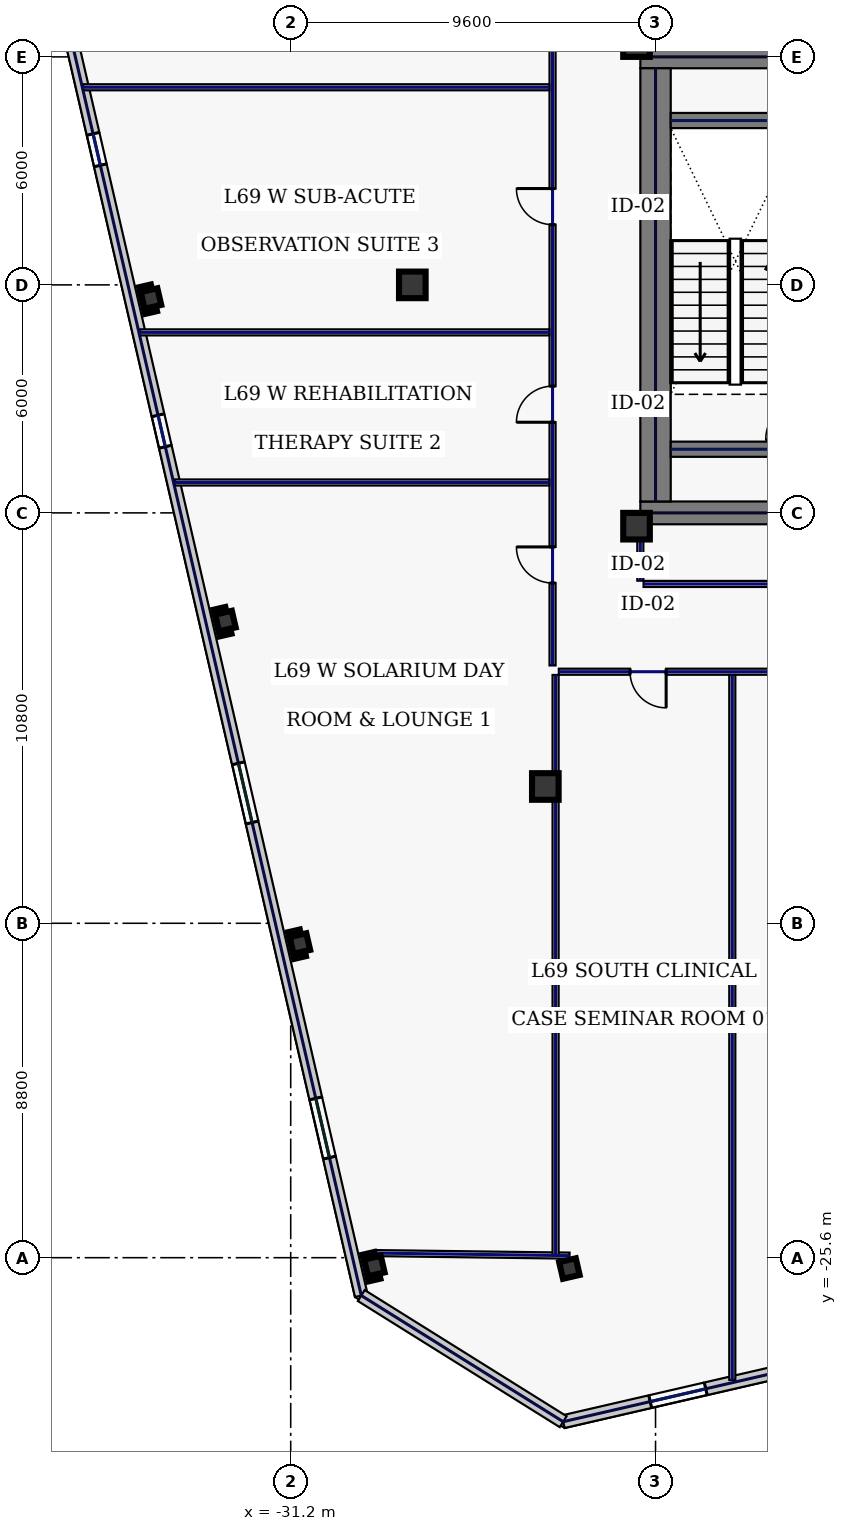
"""IFC4 building model, lengths in metres.
Left out: names, types, materials, properties, quantities, classifications, styles, units other than length and angle.
Written with IfcOpenShell. Run it as: python <this file> out.ifc"""

import sys

from ifc_helpers import new_model, si_unit, direction, frame, frame_2d, origin, origin_2d, place, context, subcontext, project, spatial, rectangle, hollow_rectangle, extrude, element, fill, save


model = new_model("IFC4")
c1 = context("Model", 3, precision=1e-05, world=origin(), true_north=direction((0.0, 1.0)))
c2 = subcontext(c1, "Body", "Model", "MODEL_VIEW")
j1 = project(units=[si_unit("LENGTHUNIT", "METRE"), si_unit("PLANEANGLEUNIT", "RADIAN")], contexts=[c1])
p1 = place(None, origin())
s1 = spatial("IfcSite", under=j1, at=p1, CompositionType="ELEMENT")
p2 = place(p1, origin())
s2 = spatial("IfcBuilding", under=s1, at=p2, CompositionType="ELEMENT")
p3 = place(p2, frame((0.0, 0.0, 297.0)))
s3 = spatial("IfcBuildingStorey", under=s2, at=p3, CompositionType="ELEMENT", Elevation=297.0)
for number, where, z_axis, x_axis in (
    (1, (-22.0, 6.0, 0.0), (0.0, 0.0, 1.0), (1.0, 0.0, 0.0)),
    (2, (-22.0, -6.0, 0.0), (0.0, 0.0, 1.0), (1.0, 0.0, 0.0)),
):
    element("IfcWall", number, at=place(p3, frame(where, z_axis=z_axis, x_axis=x_axis)), inside=s3, PredefinedType="SHEAR", context=c2, shape_type="SweptSolid", body=[
        extrude(rectangle(XDim=11.5, YDim=0.6, at=frame_2d((5.75, 0.0))), origin(), (0.0, 0.0, 1.0), 3.74),
    ])
p4 = place(p3, frame((-21.6, -5.7, 0.0), z_axis=(0.0, 0.0, 1.0), x_axis=(0.0, 1.0, 0.0)))
e3 = element("IfcWall", 3, at=p4, inside=s3, PredefinedType="SHEAR", context=c2, shape_type="SweptSolid", body=[
    extrude(rectangle(XDim=11.4, YDim=0.8, at=frame_2d((5.7, 0.0))), origin(), (0.0, 0.0, 1.0), 3.74),
])
for number, where, z_axis, x_axis in (
    (4, (-21.2, -4.325, 0.0), (0.0, 0.0, 1.0), (1.0, 0.0, 0.0)),
    (5, (-21.2, 4.325, 0.0), (0.0, 0.0, 1.0), (1.0, 0.0, 0.0)),
):
    element("IfcWall", number, at=place(p3, frame(where, z_axis=z_axis, x_axis=x_axis)), inside=s3, PredefinedType="SHEAR", context=c2, shape_type="SweptSolid", body=[
        extrude(rectangle(XDim=3.4, YDim=0.4, at=frame_2d((1.7, 0.0))), origin(), (0.0, 0.0, 1.0), 3.74),
    ])
for number, where, z_axis, x_axis in (
    (6, (-22.1, -6.35, 0.0), (0.0, 0.0, 1.0), (1.0, 0.0, 0.0)),
    (7, (-22.1, 6.35, 0.0), (0.0, 0.0, 1.0), (1.0, 0.0, 0.0)),
    (8, (-24.5, -13.2, 0.0), (0.0, 0.0, 1.0), (1.0, 0.0, 0.0)),
    (9, (-28.0, 0.0, 0.0), (0.0, 0.0, 1.0), (1.0, 0.0, 0.0)),
):
    element("IfcColumn", number, at=place(p3, frame(where, z_axis=z_axis, x_axis=x_axis)), inside=s3, PredefinedType="COLUMN", context=c2, shape_type="SweptSolid", body=[
        extrude(hollow_rectangle(XDim=0.7, YDim=0.7, WallThickness=0.032, at=origin_2d()), origin(), (0.0, 0.0, 1.0), 3.74),
    ])
for number, where, z_axis, x_axis in (
    (10, (-23.867, -25.886, 0.0), (0.0, 0.0, 1.0), (0.974, 0.225, 0.0)),
    (11, (-34.877, -0.359, 0.0), (0.0, 0.0, 1.0), (0.974, 0.225, 0.0)),
    (12, (-32.917, -8.845, 0.0), (0.0, 0.0, 1.0), (0.974, 0.225, 0.0)),
    (13, (-30.958, -17.332, 0.0), (0.0, 0.0, 1.0), (0.974, 0.225, 0.0)),
    (14, (-28.999, -25.819, 0.0), (0.0, 0.0, 1.0), (0.974, 0.225, 0.0)),
):
    element("IfcColumn", number, at=place(p3, frame(where, z_axis=z_axis, x_axis=x_axis)), inside=s3, PredefinedType="COLUMN", context=c2, shape_type="SweptSolid", body=[
        extrude(hollow_rectangle(XDim=0.45, YDim=0.45, WallThickness=0.022, at=origin_2d()), origin(), (0.0, 0.0, 1.0), 3.74),
    ])
p5 = place(p3, frame((-24.03, -29.916, 0.0), z_axis=(0.0, 0.0, 1.0), x_axis=(0.974370978061, 0.224947098473, 0.0)))
e15 = element("IfcWall", 15, at=p5, inside=s3, PredefinedType="STANDARD", context=c2, shape_type="SweptSolid", body=[
    extrude(rectangle(XDim=17.506, YDim=0.34, at=frame_2d((8.753, 0.0))), origin(), (0.0, 0.0, 1.0), 3.74),
])
p6 = place(p5, frame((2.35, 0.0, 0.9)))
e16 = element("IfcOpeningElement", 16, at=p6, cuts=e15, PredefinedType="OPENING", context=c2, shape_type="SweptSolid", body=[
    extrude(rectangle(XDim=1.5, YDim=2.0, at=frame_2d((0.75, 1.0))), frame((0.0, 0.18, 0.0), z_axis=(0.0, -1.0, 0.0), x_axis=(1.0, 0.0, 0.0)), (0.0, 0.0, 1.0), 0.36),
])
p7 = place(p5, frame((5.817, 0.0, 0.9)))
e17 = element("IfcOpeningElement", 17, at=p7, cuts=e15, PredefinedType="OPENING", context=c2, shape_type="SweptSolid", body=[
    extrude(rectangle(XDim=1.5, YDim=2.0, at=frame_2d((0.75, 1.0))), frame((0.0, 0.18, 0.0), z_axis=(0.0, -1.0, 0.0), x_axis=(1.0, 0.0, 0.0)), (0.0, 0.0, 1.0), 0.36),
])
p8 = place(p5, frame((13.353, 0.0, 0.9)))
e18 = element("IfcOpeningElement", 18, at=p8, cuts=e15, PredefinedType="OPENING", context=c2, shape_type="SweptSolid", body=[
    extrude(rectangle(XDim=1.5, YDim=2.0, at=frame_2d((0.75, 1.0))), frame((0.0, 0.18, 0.0), z_axis=(0.0, -1.0, 0.0), x_axis=(1.0, 0.0, 0.0)), (0.0, 0.0, 1.0), 0.36),
])
p9 = place(p3, frame((-37.486, 8.676, 0.0), z_axis=(0.0, 0.0, 1.0), x_axis=(0.224953091034, -0.974369594576, 0.0)))
e19 = element("IfcWall", 19, at=p9, inside=s3, PredefinedType="STANDARD", context=c2, shape_type="SweptSolid", body=[
    extrude(rectangle(XDim=36.2, YDim=0.34, at=frame_2d((18.1, 0.0))), origin(), (0.0, 0.0, 1.0), 3.74),
])
p10 = place(p9, frame((4.825, 0.0, 0.75)))
e20 = element("IfcOpeningElement", 20, at=p10, cuts=e19, PredefinedType="OPENING", context=c2, shape_type="SweptSolid", body=[
    extrude(rectangle(XDim=0.85, YDim=1.85, at=frame_2d((0.425, 0.925))), frame((0.0, 0.18, 0.0), z_axis=(0.0, -1.0, 0.0), x_axis=(1.0, 0.0, 0.0)), (0.0, 0.0, 1.0), 0.36),
])
p11 = place(p9, frame((12.425, 0.0, 0.75)))
e21 = element("IfcOpeningElement", 21, at=p11, cuts=e19, PredefinedType="OPENING", context=c2, shape_type="SweptSolid", body=[
    extrude(rectangle(XDim=0.85, YDim=1.85, at=frame_2d((0.425, 0.925))), frame((0.0, 0.18, 0.0), z_axis=(0.0, -1.0, 0.0), x_axis=(1.0, 0.0, 0.0)), (0.0, 0.0, 1.0), 0.36),
])
p12 = place(p9, frame((21.825, 0.0, 0.58)))
e22 = element("IfcOpeningElement", 22, at=p12, cuts=e19, PredefinedType="OPENING", context=c2, shape_type="SweptSolid", body=[
    extrude(rectangle(XDim=1.6, YDim=2.3, at=frame_2d((0.8, 1.15))), frame((0.0, 0.18, 0.0), z_axis=(0.0, -1.0, 0.0), x_axis=(1.0, 0.0, 0.0)), (0.0, 0.0, 1.0), 0.36),
])
p13 = place(p9, frame((30.875, 0.0, 0.58)))
e23 = element("IfcOpeningElement", 23, at=p13, cuts=e19, PredefinedType="OPENING", context=c2, shape_type="SweptSolid", body=[
    extrude(rectangle(XDim=1.6, YDim=2.3, at=frame_2d((0.8, 1.15))), frame((0.0, 0.18, 0.0), z_axis=(0.0, -1.0, 0.0), x_axis=(1.0, 0.0, 0.0)), (0.0, 0.0, 1.0), 0.36),
])
p14 = place(p3, frame((-29.343, -26.596, 0.0), z_axis=(0.0, 0.0, 1.0), x_axis=(0.848037708252, -0.529935887993, 0.0)))
e24 = element("IfcWall", 24, at=p14, inside=s3, PredefinedType="STANDARD", context=c2, shape_type="SweptSolid", body=[
    extrude(rectangle(XDim=6.265, YDim=0.34, at=frame_2d((3.133, 0.0))), origin(), (0.0, 0.0, 1.0), 3.74),
])
p15 = place(p3, frame((-28.994, -25.479, 0.0), z_axis=(0.0, 0.0, 1.0), x_axis=(0.999915052546, -0.01303409726, 0.0)))
e25 = element("IfcWall", 25, at=p15, inside=s3, PredefinedType="PARTITIONING", context=c2, shape_type="SweptSolid", body=[
    extrude(rectangle(XDim=5.132, YDim=0.16, at=frame_2d((2.566, 0.0))), origin(), (0.0, 0.0, 1.0), 3.74),
])
p16 = place(p3, frame((-24.31, -10.015, 0.0), z_axis=(0.0, 0.0, 1.0), x_axis=(0.0, 1.0, 0.0)))
e26 = element("IfcWall", 26, at=p16, inside=s3, PredefinedType="PARTITIONING", context=c2, shape_type="SweptSolid", body=[
    extrude(rectangle(XDim=20.13, YDim=0.16, at=frame_2d((10.065, 0.0))), origin(), (0.0, 0.0, 1.0), 3.74),
])
p17 = place(p16, frame((2.169, 0.0, 0.0)))
e27 = element("IfcOpeningElement", 27, at=p17, cuts=e26, PredefinedType="OPENING", context=c2, shape_type="SweptSolid", body=[
    extrude(rectangle(XDim=0.95, YDim=2.2, at=frame_2d((0.475, 1.1))), frame((0.0, 0.09, 0.0), z_axis=(0.0, -1.0, 0.0), x_axis=(1.0, 0.0, 0.0)), (0.0, 0.0, 1.0), 0.18),
])
p18 = place(p16, frame((6.4, 0.0, 0.0)))
e28 = element("IfcOpeningElement", 28, at=p18, cuts=e26, PredefinedType="OPENING", context=c2, shape_type="SweptSolid", body=[
    extrude(rectangle(XDim=0.95, YDim=2.2, at=frame_2d((0.475, 1.1))), frame((0.0, 0.09, 0.0), z_axis=(0.0, -1.0, 0.0), x_axis=(1.0, 0.0, 0.0)), (0.0, 0.0, 1.0), 0.18),
])
p19 = place(p16, frame((11.6, 0.0, 0.0)))
e29 = element("IfcOpeningElement", 29, at=p19, cuts=e26, PredefinedType="OPENING", context=c2, shape_type="SweptSolid", body=[
    extrude(rectangle(XDim=0.95, YDim=2.2, at=frame_2d((0.475, 1.1))), frame((0.0, 0.09, 0.0), z_axis=(0.0, -1.0, 0.0), x_axis=(1.0, 0.0, 0.0)), (0.0, 0.0, 1.0), 0.18),
])
p20 = place(p16, frame((17.131, 0.0, 0.0)))
e30 = element("IfcOpeningElement", 30, at=p20, cuts=e26, PredefinedType="OPENING", context=c2, shape_type="SweptSolid", body=[
    extrude(rectangle(XDim=0.95, YDim=2.2, at=frame_2d((0.475, 1.1))), frame((0.0, 0.09, 0.0), z_axis=(0.0, -1.0, 0.0), x_axis=(1.0, 0.0, 0.0)), (0.0, 0.0, 1.0), 0.18),
])
p21 = place(p3, frame((12.535, -10.18, 0.0), z_axis=(0.0, 0.0, 1.0), x_axis=(-1.0, 0.0, 0.0)))
e31 = element("IfcWall", 31, at=p21, inside=s3, PredefinedType="PARTITIONING", context=c2, shape_type="SweptSolid", body=[
    extrude(rectangle(XDim=36.68, YDim=0.16, at=frame_2d((18.34, 0.0))), origin(), (0.0, 0.0, 1.0), 3.74),
])
p22 = place(p21, frame((33.856, 0.0, 0.0)))
e32 = element("IfcOpeningElement", 32, at=p22, cuts=e31, PredefinedType="OPENING", context=c2, shape_type="SweptSolid", body=[
    extrude(rectangle(XDim=0.95, YDim=2.2, at=frame_2d((0.475, 1.1))), frame((0.0, 0.09, 0.0), z_axis=(0.0, -1.0, 0.0), x_axis=(1.0, 0.0, 0.0)), (0.0, 0.0, 1.0), 0.18),
])
p23 = place(p21, frame((29.015, 0.0, 0.0)))
e33 = element("IfcOpeningElement", 33, at=p23, cuts=e31, PredefinedType="OPENING", context=c2, shape_type="SweptSolid", body=[
    extrude(rectangle(XDim=0.95, YDim=2.2, at=frame_2d((0.475, 1.1))), frame((0.0, 0.09, 0.0), z_axis=(0.0, -1.0, 0.0), x_axis=(1.0, 0.0, 0.0)), (0.0, 0.0, 1.0), 0.18),
])
p24 = place(p21, frame((22.935, 0.0, 0.0)))
e34 = element("IfcOpeningElement", 34, at=p24, cuts=e31, PredefinedType="OPENING", context=c2, shape_type="SweptSolid", body=[
    extrude(rectangle(XDim=1.3, YDim=2.2, at=frame_2d((0.65, 1.1))), frame((0.0, 0.09, 0.0), z_axis=(0.0, -1.0, 0.0), x_axis=(1.0, 0.0, 0.0)), (0.0, 0.0, 1.0), 0.18),
])
p25 = place(p21, frame((17.555, 0.0, 0.0)))
e35 = element("IfcOpeningElement", 35, at=p25, cuts=e31, PredefinedType="OPENING", context=c2, shape_type="SweptSolid", body=[
    extrude(rectangle(XDim=1.3, YDim=2.2, at=frame_2d((0.65, 1.1))), frame((0.0, 0.09, 0.0), z_axis=(0.0, -1.0, 0.0), x_axis=(1.0, 0.0, 0.0)), (0.0, 0.0, 1.0), 0.18),
])
p26 = place(p21, frame((9.97, 0.0, 0.0)))
e36 = element("IfcOpeningElement", 36, at=p26, cuts=e31, PredefinedType="OPENING", context=c2, shape_type="SweptSolid", body=[
    extrude(rectangle(XDim=1.3, YDim=2.2, at=frame_2d((0.65, 1.1))), frame((0.0, 0.09, 0.0), z_axis=(0.0, -1.0, 0.0), x_axis=(1.0, 0.0, 0.0)), (0.0, 0.0, 1.0), 0.18),
])
p27 = place(p21, frame((2.329, 0.0, 0.0)))
e37 = element("IfcOpeningElement", 37, at=p27, cuts=e31, PredefinedType="OPENING", context=c2, shape_type="SweptSolid", body=[
    extrude(rectangle(XDim=0.95, YDim=2.2, at=frame_2d((0.475, 1.1))), frame((0.0, 0.09, 0.0), z_axis=(0.0, -1.0, 0.0), x_axis=(1.0, 0.0, 0.0)), (0.0, 0.0, 1.0), 0.18),
])
p28 = place(p3, frame((-22.0, -6.42, 0.0), z_axis=(0.0, 0.0, 1.0), x_axis=(0.0, -1.0, 0.0)))
e38 = element("IfcWall", 38, at=p28, inside=s3, PredefinedType="PARTITIONING", context=c2, shape_type="SweptSolid", body=[
    extrude(rectangle(XDim=1.365, YDim=0.16, at=frame_2d((0.683, 0.0))), origin(), (0.0, 0.0, 1.0), 3.74),
])
p29 = place(p3, frame((-21.915, -7.87, 0.0), z_axis=(0.0, 0.0, 1.0), x_axis=(1.0, 0.0, 0.0)))
e39 = element("IfcWall", 39, at=p29, inside=s3, PredefinedType="PARTITIONING", context=c2, shape_type="SweptSolid", body=[
    extrude(rectangle(XDim=11.2, YDim=0.16, at=frame_2d((5.6, 0.0))), origin(), (0.0, 0.0, 1.0), 3.74),
])
p30 = place(p3, frame((-24.23, -25.536, 0.0), z_axis=(0.0, 0.0, 1.0), x_axis=(0.0, 1.0, 0.0)))
e40 = element("IfcWall", 40, at=p30, inside=s3, PredefinedType="PARTITIONING", context=c2, shape_type="SweptSolid", body=[
    extrude(rectangle(XDim=15.271, YDim=0.16, at=frame_2d((7.635, 0.0))), origin(), (0.0, 0.0, 1.0), 3.335),
])
p31 = place(p3, frame((-19.58, -28.817, 0.0), z_axis=(0.0, 0.0, 1.0), x_axis=(0.0, 1.0, 0.0)))
e41 = element("IfcWall", 41, at=p31, inside=s3, PredefinedType="PARTITIONING", context=c2, shape_type="SweptSolid", body=[
    extrude(rectangle(XDim=18.552, YDim=0.16, at=frame_2d((9.276, 0.0))), origin(), (0.0, 0.0, 1.0), 3.74),
])
p32 = place(p3, frame((-34.262, -5.2, 0.0), z_axis=(0.0, 0.0, 1.0), x_axis=(1.0, 0.0, 0.0)))
e42 = element("IfcWall", 42, at=p32, inside=s3, PredefinedType="PARTITIONING", context=c2, shape_type="SweptSolid", body=[
    extrude(rectangle(XDim=9.867, YDim=0.16, at=frame_2d((4.933, 0.0))), origin(), (0.0, 0.0, 1.0), 3.74),
])
p33 = place(p3, frame((-35.174, -1.25, 0.0), z_axis=(0.0, 0.0, 1.0), x_axis=(1.0, 0.0, 0.0)))
e43 = element("IfcWall", 43, at=p33, inside=s3, PredefinedType="PARTITIONING", context=c2, shape_type="SweptSolid", body=[
    extrude(rectangle(XDim=10.779, YDim=0.16, at=frame_2d((5.389, 0.0))), origin(), (0.0, 0.0, 1.0), 3.74),
])
p34 = place(p3, frame((-36.663, 5.2, 0.0), z_axis=(0.0, 0.0, 1.0), x_axis=(1.0, 0.0, 0.0)))
e44 = element("IfcWall", 44, at=p34, inside=s3, PredefinedType="PARTITIONING", context=c2, shape_type="SweptSolid", body=[
    extrude(rectangle(XDim=12.268, YDim=0.16, at=frame_2d((6.134, 0.0))), origin(), (0.0, 0.0, 1.0), 3.74),
])
p35 = place(p6, origin())
e45 = element("IfcWindow", 45, at=p35, inside=s3, PartitioningType="SINGLE_PANEL", PredefinedType="WINDOW", context=c2, shape_type="SweptSolid", body=[
    extrude(rectangle(XDim=1.5, YDim=2.0, at=frame_2d((0.75, 1.0))), frame((0.0, 0.03, 0.0), z_axis=(0.0, -1.0, 0.0), x_axis=(1.0, 0.0, 0.0)), (0.0, 0.0, 1.0), 0.06),
])
fill(e16, e45)
p36 = place(p10, origin())
e46 = element("IfcWindow", 46, at=p36, inside=s3, PartitioningType="SINGLE_PANEL", PredefinedType="WINDOW", context=c2, shape_type="SweptSolid", body=[
    extrude(rectangle(XDim=0.85, YDim=1.85, at=frame_2d((0.425, 0.925))), frame((0.0, 0.03, 0.0), z_axis=(0.0, -1.0, 0.0), x_axis=(1.0, 0.0, 0.0)), (0.0, 0.0, 1.0), 0.06),
])
fill(e20, e46)
p37 = place(p11, origin())
e47 = element("IfcWindow", 47, at=p37, inside=s3, PartitioningType="SINGLE_PANEL", PredefinedType="WINDOW", context=c2, shape_type="SweptSolid", body=[
    extrude(rectangle(XDim=0.85, YDim=1.85, at=frame_2d((0.425, 0.925))), frame((0.0, 0.03, 0.0), z_axis=(0.0, -1.0, 0.0), x_axis=(1.0, 0.0, 0.0)), (0.0, 0.0, 1.0), 0.06),
])
fill(e21, e47)
p38 = place(p12, origin())
e48 = element("IfcWindow", 48, at=p38, inside=s3, PartitioningType="SINGLE_PANEL", PredefinedType="WINDOW", context=c2, shape_type="SweptSolid", body=[
    extrude(rectangle(XDim=1.6, YDim=2.3, at=frame_2d((0.8, 1.15))), frame((0.0, 0.03, 0.0), z_axis=(0.0, -1.0, 0.0), x_axis=(1.0, 0.0, 0.0)), (0.0, 0.0, 1.0), 0.06),
])
fill(e22, e48)
p39 = place(p13, origin())
e49 = element("IfcWindow", 49, at=p39, inside=s3, PartitioningType="SINGLE_PANEL", PredefinedType="WINDOW", context=c2, shape_type="SweptSolid", body=[
    extrude(rectangle(XDim=1.6, YDim=2.3, at=frame_2d((0.8, 1.15))), frame((0.0, 0.03, 0.0), z_axis=(0.0, -1.0, 0.0), x_axis=(1.0, 0.0, 0.0)), (0.0, 0.0, 1.0), 0.06),
])
fill(e23, e49)
p40 = place(p22, origin())
e50 = element("IfcDoor", 50, at=p40, inside=s3, OperationType="SINGLE_SWING_LEFT", PredefinedType="DOOR", context=c2, shape_type="SweptSolid", body=[
    extrude(rectangle(XDim=0.95, YDim=2.2, at=frame_2d((0.475, 1.1))), frame((0.0, 0.025, 0.0), z_axis=(0.0, -1.0, 0.0), x_axis=(1.0, 0.0, 0.0)), (0.0, 0.0, 1.0), 0.05),
])
fill(e32, e50)
p41 = place(p17, origin())
e51 = element("IfcDoor", 51, at=p41, inside=s3, OperationType="SINGLE_SWING_RIGHT", PredefinedType="DOOR", context=c2, shape_type="SweptSolid", body=[
    extrude(rectangle(XDim=0.95, YDim=2.2, at=frame_2d((0.475, 1.1))), frame((0.0, 0.025, 0.0), z_axis=(0.0, -1.0, 0.0), x_axis=(1.0, 0.0, 0.0)), (0.0, 0.0, 1.0), 0.05),
])
fill(e27, e51)
p42 = place(p18, origin())
e52 = element("IfcDoor", 52, at=p42, inside=s3, OperationType="SINGLE_SWING_LEFT", PredefinedType="DOOR", context=c2, shape_type="SweptSolid", body=[
    extrude(rectangle(XDim=0.95, YDim=2.2, at=frame_2d((0.475, 1.1))), frame((0.0, 0.025, 0.0), z_axis=(0.0, -1.0, 0.0), x_axis=(1.0, 0.0, 0.0)), (0.0, 0.0, 1.0), 0.05),
])
fill(e28, e52)
p43 = place(p19, origin())
e53 = element("IfcDoor", 53, at=p43, inside=s3, OperationType="SINGLE_SWING_RIGHT", PredefinedType="DOOR", context=c2, shape_type="SweptSolid", body=[
    extrude(rectangle(XDim=0.95, YDim=2.2, at=frame_2d((0.475, 1.1))), frame((0.0, 0.025, 0.0), z_axis=(0.0, -1.0, 0.0), x_axis=(1.0, 0.0, 0.0)), (0.0, 0.0, 1.0), 0.05),
])
fill(e29, e53)
save(model, sys.argv[1])
